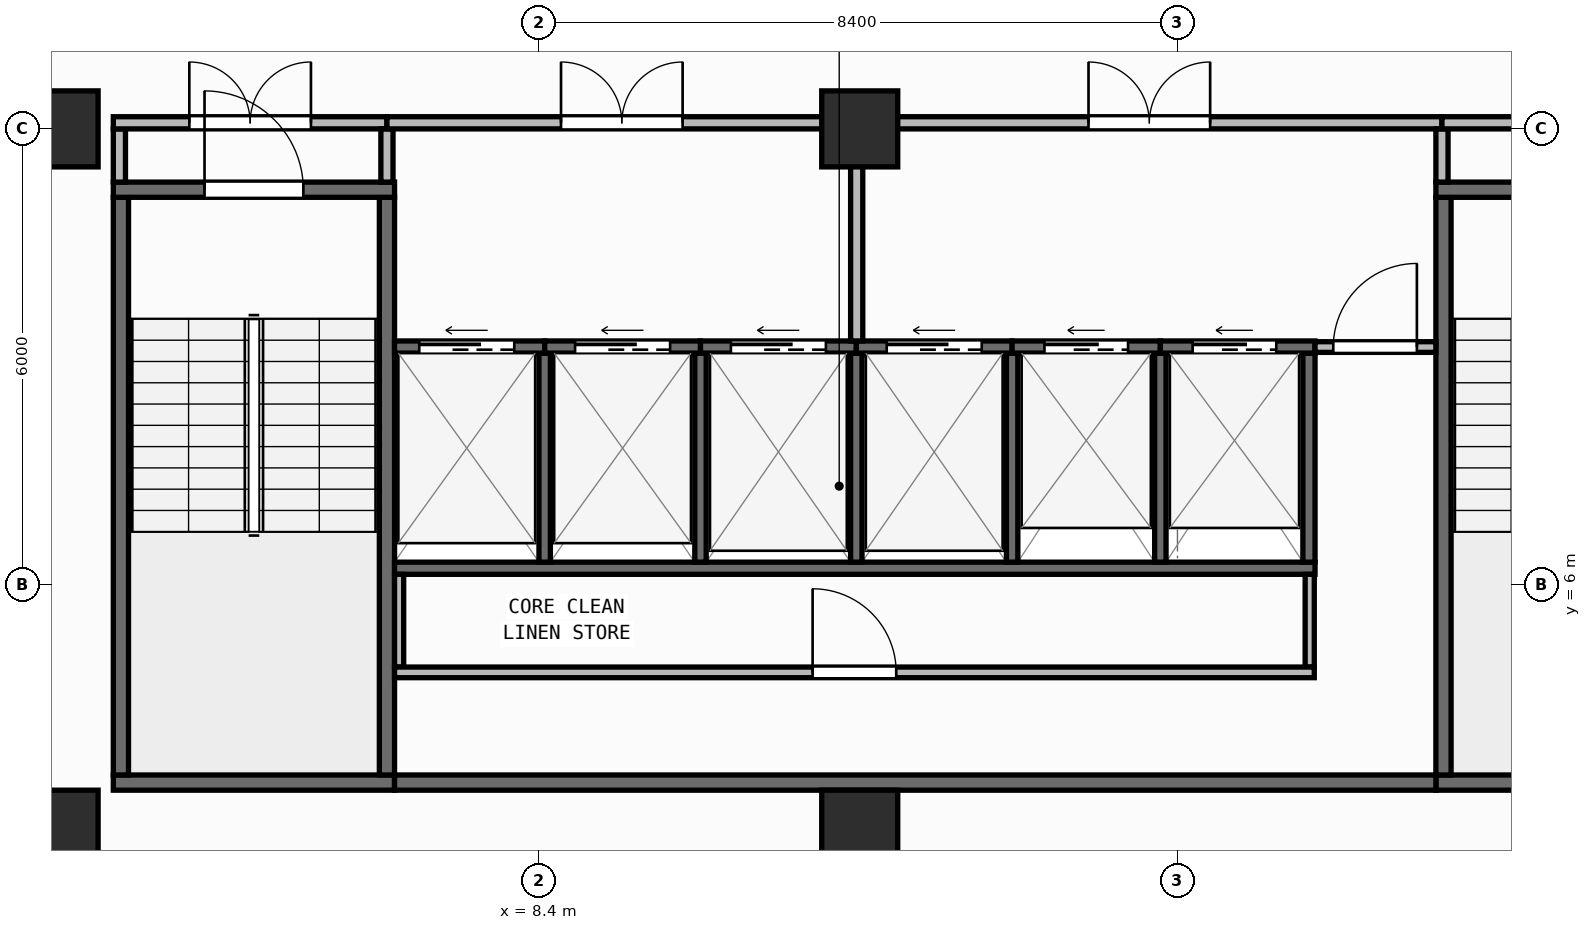
"""IFC4 building model, lengths in metres.
Left out: names, types, materials, properties, quantities, classifications, styles, units other than length and angle.
Written with IfcOpenShell. Run it as: python <this file> out.ifc"""

import sys

from ifc_helpers import new_model, si_unit, direction, frame, frame_2d, origin, origin_2d, place, context, subcontext, project, spatial, rectangle, extrude, element, fill, save


model = new_model("IFC4")
c1 = context("Model", 3, precision=1e-05, world=origin(), true_north=direction((0.0, 1.0)))
c2 = subcontext(c1, "Body", "Model", "MODEL_VIEW")
j1 = project(units=[si_unit("LENGTHUNIT", "METRE"), si_unit("PLANEANGLEUNIT", "RADIAN")], contexts=[c1])
p1 = place(None, origin())
s1 = spatial("IfcSite", under=j1, at=p1, CompositionType="ELEMENT")
p2 = place(p1, origin())
s2 = spatial("IfcBuilding", under=s1, at=p2, CompositionType="ELEMENT")
p3 = place(p2, frame((0.0, 0.0, 184.2)))
s3 = spatial("IfcBuildingStorey", under=s2, at=p3, CompositionType="ELEMENT", Elevation=184.2)
for number, where, z_axis, x_axis in (
    (1, (2.1, 2.8, 0.0), (0.0, 0.0, 1.0), (1.0, 0.0, 0.0)),
    (2, (12.62, 2.8, 0.0), (0.0, 0.0, 1.0), (1.0, 0.0, 0.0)),
    (3, (2.1, 12.0, 0.0), (0.0, 0.0, 1.0), (1.0, 0.0, 0.0)),
    (4, (12.62, 12.0, 0.0), (0.0, 0.0, 1.0), (1.0, 0.0, 0.0)),
):
    element("IfcColumn", number, at=place(p3, frame(where, z_axis=z_axis, x_axis=x_axis)), inside=s3, PredefinedType="COLUMN", context=c2, shape_type="SweptSolid", body=[
        extrude(rectangle(XDim=1.0, YDim=1.0, at=origin_2d()), origin(), (0.0, 0.0, 1.0), 3.95),
    ])
p4 = place(p3, frame((2.66, 0.174, 0.0), z_axis=(0.0, 0.0, 1.0), x_axis=(0.996634028439, 0.081979347142, 0.0)))
e5 = element("IfcWall", 5, at=p4, inside=s3, PredefinedType="STANDARD", context=c2, shape_type="SweptSolid", body=[
    extrude(rectangle(XDim=46.035, YDim=0.26, at=frame_2d((23.018, 0.0))), origin(), (0.0, 0.0, 1.0), 3.71),
])
p5 = place(p4, frame((21.817, 0.0, 0.9)))
e6 = element("IfcOpeningElement", 6, at=p5, cuts=e5, PredefinedType="OPENING", context=c2, shape_type="SweptSolid", body=[
    extrude(rectangle(XDim=2.4, YDim=1.65, at=frame_2d((1.2, 0.825))), frame((0.0, 0.14, 0.0), z_axis=(0.0, -1.0, 0.0), x_axis=(1.0, 0.0, 0.0)), (0.0, 0.0, 1.0), 0.28),
])
p6 = place(p3, frame((2.8, 3.4, 0.0), z_axis=(0.0, 0.0, 1.0), x_axis=(1.0, 0.0, 0.0)))
e7 = element("IfcWall", 7, at=p6, inside=s3, PredefinedType="SHEAR", context=c2, shape_type="SweptSolid", body=[
    extrude(rectangle(XDim=3.7, YDim=0.2, at=frame_2d((1.85, 0.0))), origin(), (0.0, 0.0, 1.0), 3.71),
])
for number, where, z_axis, x_axis in (
    (8, (2.9, 3.5, 0.0), (0.0, 0.0, 1.0), (0.0, 1.0, 0.0)),
    (9, (6.4, 3.5, 0.0), (0.0, 0.0, 1.0), (0.0, 1.0, 0.0)),
):
    element("IfcWall", number, at=place(p3, frame(where, z_axis=z_axis, x_axis=x_axis)), inside=s3, PredefinedType="SHEAR", context=c2, shape_type="SweptSolid", body=[
        extrude(rectangle(XDim=7.6, YDim=0.2, at=frame_2d((3.8, 0.0))), origin(), (0.0, 0.0, 1.0), 3.71),
    ])
p7 = place(p3, frame((2.8, 11.2, 0.0), z_axis=(0.0, 0.0, 1.0), x_axis=(1.0, 0.0, 0.0)))
e10 = element("IfcWall", 10, at=p7, inside=s3, PredefinedType="SHEAR", context=c2, shape_type="SweptSolid", body=[
    extrude(rectangle(XDim=3.7, YDim=0.2, at=frame_2d((1.85, 0.0))), origin(), (0.0, 0.0, 1.0), 3.71),
])
p8 = place(p7, frame((1.2, 0.0, 0.0)))
e11 = element("IfcOpeningElement", 11, at=p8, cuts=e10, PredefinedType="OPENING", context=c2, shape_type="SweptSolid", body=[
    extrude(rectangle(XDim=1.3, YDim=2.15, at=frame_2d((0.65, 1.075))), frame((0.0, 0.11, 0.0), z_axis=(0.0, -1.0, 0.0), x_axis=(1.0, 0.0, 0.0)), (0.0, 0.0, 1.0), 0.22),
])
p9 = place(p3, frame((20.2, 3.4, 0.0), z_axis=(0.0, 0.0, 1.0), x_axis=(1.0, 0.0, 0.0)))
e12 = element("IfcWall", 12, at=p9, inside=s3, PredefinedType="SHEAR", context=c2, shape_type="SweptSolid", body=[
    extrude(rectangle(XDim=3.7, YDim=0.2, at=frame_2d((1.85, 0.0))), origin(), (0.0, 0.0, 1.0), 3.71),
])
p10 = place(p3, frame((20.3, 3.5, 0.0), z_axis=(0.0, 0.0, 1.0), x_axis=(0.0, 1.0, 0.0)))
e13 = element("IfcWall", 13, at=p10, inside=s3, PredefinedType="SHEAR", context=c2, shape_type="SweptSolid", body=[
    extrude(rectangle(XDim=7.6, YDim=0.2, at=frame_2d((3.8, 0.0))), origin(), (0.0, 0.0, 1.0), 3.71),
])
p11 = place(p3, frame((20.2, 11.2, 0.0), z_axis=(0.0, 0.0, 1.0), x_axis=(1.0, 0.0, 0.0)))
e14 = element("IfcWall", 14, at=p11, inside=s3, PredefinedType="SHEAR", context=c2, shape_type="SweptSolid", body=[
    extrude(rectangle(XDim=3.7, YDim=0.2, at=frame_2d((1.85, 0.0))), origin(), (0.0, 0.0, 1.0), 3.71),
])
p12 = place(p11, frame((1.2, 0.0, 0.0)))
e15 = element("IfcOpeningElement", 15, at=p12, cuts=e14, PredefinedType="OPENING", context=c2, shape_type="SweptSolid", body=[
    extrude(rectangle(XDim=1.3, YDim=2.15, at=frame_2d((0.65, 1.075))), frame((0.0, 0.11, 0.0), z_axis=(0.0, -1.0, 0.0), x_axis=(1.0, 0.0, 0.0)), (0.0, 0.0, 1.0), 0.22),
])
p13 = place(p3, frame((6.5, 3.4, 0.0), z_axis=(0.0, 0.0, 1.0), x_axis=(1.0, 0.0, 0.0)))
e16 = element("IfcWall", 16, at=p13, inside=s3, PredefinedType="SHEAR", context=c2, shape_type="SweptSolid", body=[
    extrude(rectangle(XDim=13.7, YDim=0.2, at=frame_2d((6.85, 0.0))), origin(), (0.0, 0.0, 1.0), 3.71),
])
p14 = place(p3, frame((6.5, 6.22, 0.0), z_axis=(0.0, 0.0, 1.0), x_axis=(1.0, 0.0, 0.0)))
e17 = element("IfcWall", 17, at=p14, inside=s3, PredefinedType="SHEAR", context=c2, shape_type="SweptSolid", body=[
    extrude(rectangle(XDim=12.11, YDim=0.16, at=frame_2d((6.055, 0.0))), origin(), (0.0, 0.0, 1.0), 3.71),
])
p15 = place(p3, frame((18.53, 6.3, 0.0), z_axis=(0.0, 0.0, 1.0), x_axis=(0.0, 1.0, 0.0)))
e18 = element("IfcWall", 18, at=p15, inside=s3, PredefinedType="SHEAR", context=c2, shape_type="SweptSolid", body=[
    extrude(rectangle(XDim=2.75, YDim=0.16, at=frame_2d((1.375, 0.0))), origin(), (0.0, 0.0, 1.0), 3.71),
])
for number, where, z_axis, x_axis in (
    (19, (8.475, 6.3, 0.0), (0.0, 0.0, 1.0), (0.0, 1.0, 0.0)),
    (20, (10.525, 6.3, 0.0), (0.0, 0.0, 1.0), (0.0, 1.0, 0.0)),
    (21, (12.575, 6.3, 0.0), (0.0, 0.0, 1.0), (0.0, 1.0, 0.0)),
    (22, (14.625, 6.3, 0.0), (0.0, 0.0, 1.0), (0.0, 1.0, 0.0)),
    (23, (16.575, 6.3, 0.0), (0.0, 0.0, 1.0), (0.0, 1.0, 0.0)),
):
    element("IfcWall", number, at=place(p3, frame(where, z_axis=z_axis, x_axis=x_axis)), inside=s3, PredefinedType="SHEAR", context=c2, shape_type="SweptSolid", body=[
        extrude(rectangle(XDim=2.75, YDim=0.15, at=frame_2d((1.375, 0.0))), origin(), (0.0, 0.0, 1.0), 3.71),
    ])
p16 = place(p3, frame((6.5, 9.13, 0.0), z_axis=(0.0, 0.0, 1.0), x_axis=(1.0, 0.0, 0.0)))
e24 = element("IfcWall", 24, at=p16, inside=s3, PredefinedType="SHEAR", context=c2, shape_type="SweptSolid", body=[
    extrude(rectangle(XDim=1.975, YDim=0.16, at=frame_2d((0.988, 0.0))), origin(), (0.0, 0.0, 1.0), 3.71),
])
p17 = place(p16, frame((0.325, 0.0, 0.0)))
e25 = element("IfcOpeningElement", 25, at=p17, cuts=e24, PredefinedType="OPENING", context=c2, shape_type="SweptSolid", body=[
    extrude(rectangle(XDim=1.25, YDim=2.15, at=frame_2d((0.625, 1.075))), frame((0.0, 0.09, 0.0), z_axis=(0.0, -1.0, 0.0), x_axis=(1.0, 0.0, 0.0)), (0.0, 0.0, 1.0), 0.18),
])
p18 = place(p3, frame((8.475, 9.13, 0.0), z_axis=(0.0, 0.0, 1.0), x_axis=(1.0, 0.0, 0.0)))
e26 = element("IfcWall", 26, at=p18, inside=s3, PredefinedType="SHEAR", context=c2, shape_type="SweptSolid", body=[
    extrude(rectangle(XDim=2.05, YDim=0.16, at=frame_2d((1.025, 0.0))), origin(), (0.0, 0.0, 1.0), 3.71),
])
p19 = place(p18, frame((0.4, 0.0, 0.0)))
e27 = element("IfcOpeningElement", 27, at=p19, cuts=e26, PredefinedType="OPENING", context=c2, shape_type="SweptSolid", body=[
    extrude(rectangle(XDim=1.25, YDim=2.15, at=frame_2d((0.625, 1.075))), frame((0.0, 0.09, 0.0), z_axis=(0.0, -1.0, 0.0), x_axis=(1.0, 0.0, 0.0)), (0.0, 0.0, 1.0), 0.18),
])
p20 = place(p3, frame((10.525, 9.13, 0.0), z_axis=(0.0, 0.0, 1.0), x_axis=(1.0, 0.0, 0.0)))
e28 = element("IfcWall", 28, at=p20, inside=s3, PredefinedType="SHEAR", context=c2, shape_type="SweptSolid", body=[
    extrude(rectangle(XDim=2.05, YDim=0.16, at=frame_2d((1.025, 0.0))), origin(), (0.0, 0.0, 1.0), 3.71),
])
p21 = place(p20, frame((0.4, 0.0, 0.0)))
e29 = element("IfcOpeningElement", 29, at=p21, cuts=e28, PredefinedType="OPENING", context=c2, shape_type="SweptSolid", body=[
    extrude(rectangle(XDim=1.25, YDim=2.15, at=frame_2d((0.625, 1.075))), frame((0.0, 0.09, 0.0), z_axis=(0.0, -1.0, 0.0), x_axis=(1.0, 0.0, 0.0)), (0.0, 0.0, 1.0), 0.18),
])
p22 = place(p3, frame((12.575, 9.13, 0.0), z_axis=(0.0, 0.0, 1.0), x_axis=(1.0, 0.0, 0.0)))
e30 = element("IfcWall", 30, at=p22, inside=s3, PredefinedType="SHEAR", context=c2, shape_type="SweptSolid", body=[
    extrude(rectangle(XDim=2.05, YDim=0.16, at=frame_2d((1.025, 0.0))), origin(), (0.0, 0.0, 1.0), 3.71),
])
p23 = place(p22, frame((0.4, 0.0, 0.0)))
e31 = element("IfcOpeningElement", 31, at=p23, cuts=e30, PredefinedType="OPENING", context=c2, shape_type="SweptSolid", body=[
    extrude(rectangle(XDim=1.25, YDim=2.15, at=frame_2d((0.625, 1.075))), frame((0.0, 0.09, 0.0), z_axis=(0.0, -1.0, 0.0), x_axis=(1.0, 0.0, 0.0)), (0.0, 0.0, 1.0), 0.18),
])
p24 = place(p3, frame((14.625, 9.13, 0.0), z_axis=(0.0, 0.0, 1.0), x_axis=(1.0, 0.0, 0.0)))
e32 = element("IfcWall", 32, at=p24, inside=s3, PredefinedType="SHEAR", context=c2, shape_type="SweptSolid", body=[
    extrude(rectangle(XDim=1.95, YDim=0.16, at=frame_2d((0.975, 0.0))), origin(), (0.0, 0.0, 1.0), 3.71),
])
p25 = place(p24, frame((0.425, 0.0, 0.0)))
e33 = element("IfcOpeningElement", 33, at=p25, cuts=e32, PredefinedType="OPENING", context=c2, shape_type="SweptSolid", body=[
    extrude(rectangle(XDim=1.1, YDim=2.15, at=frame_2d((0.55, 1.075))), frame((0.0, 0.09, 0.0), z_axis=(0.0, -1.0, 0.0), x_axis=(1.0, 0.0, 0.0)), (0.0, 0.0, 1.0), 0.18),
])
p26 = place(p3, frame((16.575, 9.13, 0.0), z_axis=(0.0, 0.0, 1.0), x_axis=(1.0, 0.0, 0.0)))
e34 = element("IfcWall", 34, at=p26, inside=s3, PredefinedType="SHEAR", context=c2, shape_type="SweptSolid", body=[
    extrude(rectangle(XDim=2.035, YDim=0.16, at=frame_2d((1.018, 0.0))), origin(), (0.0, 0.0, 1.0), 3.71),
])
p27 = place(p26, frame((0.425, 0.0, 0.0)))
e35 = element("IfcOpeningElement", 35, at=p27, cuts=e34, PredefinedType="OPENING", context=c2, shape_type="SweptSolid", body=[
    extrude(rectangle(XDim=1.1, YDim=2.15, at=frame_2d((0.55, 1.075))), frame((0.0, 0.09, 0.0), z_axis=(0.0, -1.0, 0.0), x_axis=(1.0, 0.0, 0.0)), (0.0, 0.0, 1.0), 0.18),
])
for number, where, z_axis, x_axis in (
    (36, (6.56, 4.92, 0.0), (0.0, 0.0, 1.0), (0.0, 1.0, 0.0)),
    (37, (18.54, 4.92, 0.0), (0.0, 0.0, 1.0), (0.0, 1.0, 0.0)),
):
    element("IfcWall", number, at=place(p3, frame(where, z_axis=z_axis, x_axis=x_axis)), inside=s3, PredefinedType="PARTITIONING", context=c2, shape_type="SweptSolid", body=[
        extrude(rectangle(XDim=1.22, YDim=0.12, at=frame_2d((0.61, 0.0))), origin(), (0.0, 0.0, 1.0), 3.71),
    ])
p28 = place(p3, frame((6.5, 4.85, 0.0), z_axis=(0.0, 0.0, 1.0), x_axis=(1.0, 0.0, 0.0)))
e38 = element("IfcWall", 38, at=p28, inside=s3, PredefinedType="PARTITIONING", context=c2, shape_type="SweptSolid", body=[
    extrude(rectangle(XDim=12.1, YDim=0.14, at=frame_2d((6.05, 0.0))), origin(), (0.0, 0.0, 1.0), 3.71),
])
p29 = place(p28, frame((5.5, 0.0, 0.0)))
e39 = element("IfcOpeningElement", 39, at=p29, cuts=e38, PredefinedType="OPENING", context=c2, shape_type="SweptSolid", body=[
    extrude(rectangle(XDim=1.1, YDim=2.1, at=frame_2d((0.55, 1.05))), frame((0.0, 0.08, 0.0), z_axis=(0.0, -1.0, 0.0), x_axis=(1.0, 0.0, 0.0)), (0.0, 0.0, 1.0), 0.16),
])
p30 = place(p3, frame((18.61, 9.13, 0.0), z_axis=(0.0, 0.0, 1.0), x_axis=(1.0, 0.0, 0.0)))
e40 = element("IfcWall", 40, at=p30, inside=s3, PredefinedType="PARTITIONING", context=c2, shape_type="SweptSolid", body=[
    extrude(rectangle(XDim=1.59, YDim=0.14, at=frame_2d((0.795, 0.0))), origin(), (0.0, 0.0, 1.0), 3.71),
])
p31 = place(p30, frame((0.24, 0.0, 0.0)))
e41 = element("IfcOpeningElement", 41, at=p31, cuts=e40, PredefinedType="OPENING", context=c2, shape_type="SweptSolid", body=[
    extrude(rectangle(XDim=1.1, YDim=2.1, at=frame_2d((0.55, 1.05))), frame((0.0, 0.08, 0.0), z_axis=(0.0, -1.0, 0.0), x_axis=(1.0, 0.0, 0.0)), (0.0, 0.0, 1.0), 0.16),
])
p32 = place(p3, frame((2.88, 11.3, 0.0), z_axis=(0.0, 0.0, 1.0), x_axis=(0.0, 1.0, 0.0)))
e42 = element("IfcWall", 42, at=p32, inside=s3, PredefinedType="PARTITIONING", context=c2, shape_type="SweptSolid", body=[
    extrude(rectangle(XDim=0.7, YDim=0.16, at=frame_2d((0.35, 0.0))), origin(), (0.0, 0.0, 1.0), 3.71),
])
p33 = place(p3, frame((2.8, 12.08, 0.0), z_axis=(0.0, 0.0, 1.0), x_axis=(1.0, 0.0, 0.0)))
e43 = element("IfcWall", 43, at=p33, inside=s3, PredefinedType="PARTITIONING", context=c2, shape_type="SweptSolid", body=[
    extrude(rectangle(XDim=3.6, YDim=0.16, at=frame_2d((1.8, 0.0))), origin(), (0.0, 0.0, 1.0), 3.152),
])
p34 = place(p33, frame((1.0, 0.0, 0.0)))
e44 = element("IfcOpeningElement", 44, at=p34, cuts=e43, PredefinedType="OPENING", context=c2, shape_type="SweptSolid", body=[
    extrude(rectangle(XDim=1.6, YDim=2.05, at=frame_2d((0.8, 1.025))), frame((0.0, 0.09, 0.0), z_axis=(0.0, -1.0, 0.0), x_axis=(1.0, 0.0, 0.0)), (0.0, 0.0, 1.0), 0.18),
])
p35 = place(p3, frame((6.4, 11.3, 0.0), z_axis=(0.0, 0.0, 1.0), x_axis=(0.0, 1.0, 0.0)))
e45 = element("IfcWall", 45, at=p35, inside=s3, PredefinedType="PARTITIONING", context=c2, shape_type="SweptSolid", body=[
    extrude(rectangle(XDim=0.7, YDim=0.16, at=frame_2d((0.35, 0.0))), origin(), (0.0, 0.0, 1.0), 3.71),
])
p36 = place(p3, frame((6.4, 12.08, 0.0), z_axis=(0.0, 0.0, 1.0), x_axis=(1.0, 0.0, 0.0)))
e46 = element("IfcWall", 46, at=p36, inside=s3, PredefinedType="PARTITIONING", context=c2, shape_type="SweptSolid", body=[
    extrude(rectangle(XDim=6.18, YDim=0.16, at=frame_2d((3.09, 0.0))), origin(), (0.0, 0.0, 1.0), 3.152),
])
p37 = place(p36, frame((2.29, 0.0, 0.0)))
e47 = element("IfcOpeningElement", 47, at=p37, cuts=e46, PredefinedType="OPENING", context=c2, shape_type="SweptSolid", body=[
    extrude(rectangle(XDim=1.6, YDim=2.05, at=frame_2d((0.8, 1.025))), frame((0.0, 0.09, 0.0), z_axis=(0.0, -1.0, 0.0), x_axis=(1.0, 0.0, 0.0)), (0.0, 0.0, 1.0), 0.18),
])
p38 = place(p3, frame((12.58, 9.21, 0.0), z_axis=(0.0, 0.0, 1.0), x_axis=(0.0, 1.0, 0.0)))
e48 = element("IfcWall", 48, at=p38, inside=s3, PredefinedType="PARTITIONING", context=c2, shape_type="SweptSolid", body=[
    extrude(rectangle(XDim=2.79, YDim=0.16, at=frame_2d((1.395, 0.0))), origin(), (0.0, 0.0, 1.0), 3.71),
])
p39 = place(p3, frame((12.58, 12.08, 0.0), z_axis=(0.0, 0.0, 1.0), x_axis=(1.0, 0.0, 0.0)))
e49 = element("IfcWall", 49, at=p39, inside=s3, PredefinedType="PARTITIONING", context=c2, shape_type="SweptSolid", body=[
    extrude(rectangle(XDim=7.7, YDim=0.16, at=frame_2d((3.85, 0.0))), origin(), (0.0, 0.0, 1.0), 3.152),
])
p40 = place(p39, frame((3.05, 0.0, 0.0)))
e50 = element("IfcOpeningElement", 50, at=p40, cuts=e49, PredefinedType="OPENING", context=c2, shape_type="SweptSolid", body=[
    extrude(rectangle(XDim=1.6, YDim=2.05, at=frame_2d((0.8, 1.025))), frame((0.0, 0.09, 0.0), z_axis=(0.0, -1.0, 0.0), x_axis=(1.0, 0.0, 0.0)), (0.0, 0.0, 1.0), 0.18),
])
p41 = place(p3, frame((20.28, 11.3, 0.0), z_axis=(0.0, 0.0, 1.0), x_axis=(0.0, 1.0, 0.0)))
e51 = element("IfcWall", 51, at=p41, inside=s3, PredefinedType="PARTITIONING", context=c2, shape_type="SweptSolid", body=[
    extrude(rectangle(XDim=0.7, YDim=0.16, at=frame_2d((0.35, 0.0))), origin(), (0.0, 0.0, 1.0), 3.71),
])
p42 = place(p3, frame((20.28, 12.08, 0.0), z_axis=(0.0, 0.0, 1.0), x_axis=(1.0, 0.0, 0.0)))
e52 = element("IfcWall", 52, at=p42, inside=s3, PredefinedType="PARTITIONING", context=c2, shape_type="SweptSolid", body=[
    extrude(rectangle(XDim=3.62, YDim=0.16, at=frame_2d((1.81, 0.0))), origin(), (0.0, 0.0, 1.0), 3.152),
])
p43 = place(p42, frame((1.01, 0.0, 0.0)))
e53 = element("IfcOpeningElement", 53, at=p43, cuts=e52, PredefinedType="OPENING", context=c2, shape_type="SweptSolid", body=[
    extrude(rectangle(XDim=1.6, YDim=2.05, at=frame_2d((0.8, 1.025))), frame((0.0, 0.09, 0.0), z_axis=(0.0, -1.0, 0.0), x_axis=(1.0, 0.0, 0.0)), (0.0, 0.0, 1.0), 0.18),
])
p44 = place(p8, origin())
e54 = element("IfcDoor", 54, at=p44, inside=s3, OperationType="SINGLE_SWING_LEFT", PredefinedType="DOOR", context=c2, shape_type="SweptSolid", body=[
    extrude(rectangle(XDim=1.3, YDim=2.15, at=frame_2d((0.65, 1.075))), frame((0.0, 0.025, 0.0), z_axis=(0.0, -1.0, 0.0), x_axis=(1.0, 0.0, 0.0)), (0.0, 0.0, 1.0), 0.05),
])
fill(e11, e54)
p45 = place(p17, origin())
e55 = element("IfcDoor", 55, at=p45, inside=s3, OperationType="SLIDING_TO_LEFT", PredefinedType="DOOR", context=c2, shape_type="SweptSolid", body=[
    extrude(rectangle(XDim=1.25, YDim=2.15, at=frame_2d((0.625, 1.075))), frame((0.0, 0.025, 0.0), z_axis=(0.0, -1.0, 0.0), x_axis=(1.0, 0.0, 0.0)), (0.0, 0.0, 1.0), 0.05),
])
fill(e25, e55)
p46 = place(p19, origin())
e56 = element("IfcDoor", 56, at=p46, inside=s3, OperationType="SLIDING_TO_LEFT", PredefinedType="DOOR", context=c2, shape_type="SweptSolid", body=[
    extrude(rectangle(XDim=1.25, YDim=2.15, at=frame_2d((0.625, 1.075))), frame((0.0, 0.025, 0.0), z_axis=(0.0, -1.0, 0.0), x_axis=(1.0, 0.0, 0.0)), (0.0, 0.0, 1.0), 0.05),
])
fill(e27, e56)
p47 = place(p21, origin())
e57 = element("IfcDoor", 57, at=p47, inside=s3, OperationType="SLIDING_TO_LEFT", PredefinedType="DOOR", context=c2, shape_type="SweptSolid", body=[
    extrude(rectangle(XDim=1.25, YDim=2.15, at=frame_2d((0.625, 1.075))), frame((0.0, 0.025, 0.0), z_axis=(0.0, -1.0, 0.0), x_axis=(1.0, 0.0, 0.0)), (0.0, 0.0, 1.0), 0.05),
])
fill(e29, e57)
p48 = place(p23, origin())
e58 = element("IfcDoor", 58, at=p48, inside=s3, OperationType="SLIDING_TO_LEFT", PredefinedType="DOOR", context=c2, shape_type="SweptSolid", body=[
    extrude(rectangle(XDim=1.25, YDim=2.15, at=frame_2d((0.625, 1.075))), frame((0.0, 0.025, 0.0), z_axis=(0.0, -1.0, 0.0), x_axis=(1.0, 0.0, 0.0)), (0.0, 0.0, 1.0), 0.05),
])
fill(e31, e58)
p49 = place(p25, origin())
e59 = element("IfcDoor", 59, at=p49, inside=s3, OperationType="SLIDING_TO_LEFT", PredefinedType="DOOR", context=c2, shape_type="SweptSolid", body=[
    extrude(rectangle(XDim=1.1, YDim=2.15, at=frame_2d((0.55, 1.075))), frame((0.0, 0.025, 0.0), z_axis=(0.0, -1.0, 0.0), x_axis=(1.0, 0.0, 0.0)), (0.0, 0.0, 1.0), 0.05),
])
fill(e33, e59)
p50 = place(p27, origin())
e60 = element("IfcDoor", 60, at=p50, inside=s3, OperationType="SLIDING_TO_LEFT", PredefinedType="DOOR", context=c2, shape_type="SweptSolid", body=[
    extrude(rectangle(XDim=1.1, YDim=2.15, at=frame_2d((0.55, 1.075))), frame((0.0, 0.025, 0.0), z_axis=(0.0, -1.0, 0.0), x_axis=(1.0, 0.0, 0.0)), (0.0, 0.0, 1.0), 0.05),
])
fill(e35, e60)
p51 = place(p29, origin())
e61 = element("IfcDoor", 61, at=p51, inside=s3, OperationType="SINGLE_SWING_LEFT", PredefinedType="DOOR", context=c2, shape_type="SweptSolid", body=[
    extrude(rectangle(XDim=1.1, YDim=2.1, at=frame_2d((0.55, 1.05))), frame((0.0, 0.025, 0.0), z_axis=(0.0, -1.0, 0.0), x_axis=(1.0, 0.0, 0.0)), (0.0, 0.0, 1.0), 0.05),
])
fill(e39, e61)
p52 = place(p31, origin())
e62 = element("IfcDoor", 62, at=p52, inside=s3, OperationType="SINGLE_SWING_RIGHT", PredefinedType="DOOR", context=c2, shape_type="SweptSolid", body=[
    extrude(rectangle(XDim=1.1, YDim=2.1, at=frame_2d((0.55, 1.05))), frame((0.0, 0.025, 0.0), z_axis=(0.0, -1.0, 0.0), x_axis=(1.0, 0.0, 0.0)), (0.0, 0.0, 1.0), 0.05),
])
fill(e41, e62)
p53 = place(p34, origin())
e63 = element("IfcDoor", 63, at=p53, inside=s3, OperationType="DOUBLE_DOOR_SINGLE_SWING", PredefinedType="DOOR", context=c2, shape_type="SweptSolid", body=[
    extrude(rectangle(XDim=1.6, YDim=2.05, at=frame_2d((0.8, 1.025))), frame((0.0, 0.025, 0.0), z_axis=(0.0, -1.0, 0.0), x_axis=(1.0, 0.0, 0.0)), (0.0, 0.0, 1.0), 0.05),
])
fill(e44, e63)
p54 = place(p37, origin())
e64 = element("IfcDoor", 64, at=p54, inside=s3, OperationType="DOUBLE_DOOR_SINGLE_SWING", PredefinedType="DOOR", context=c2, shape_type="SweptSolid", body=[
    extrude(rectangle(XDim=1.6, YDim=2.05, at=frame_2d((0.8, 1.025))), frame((0.0, 0.025, 0.0), z_axis=(0.0, -1.0, 0.0), x_axis=(1.0, 0.0, 0.0)), (0.0, 0.0, 1.0), 0.05),
])
fill(e47, e64)
p55 = place(p40, origin())
e65 = element("IfcDoor", 65, at=p55, inside=s3, OperationType="DOUBLE_DOOR_SINGLE_SWING", PredefinedType="DOOR", context=c2, shape_type="SweptSolid", body=[
    extrude(rectangle(XDim=1.6, YDim=2.05, at=frame_2d((0.8, 1.025))), frame((0.0, 0.025, 0.0), z_axis=(0.0, -1.0, 0.0), x_axis=(1.0, 0.0, 0.0)), (0.0, 0.0, 1.0), 0.05),
])
fill(e50, e65)
save(model, sys.argv[1])
